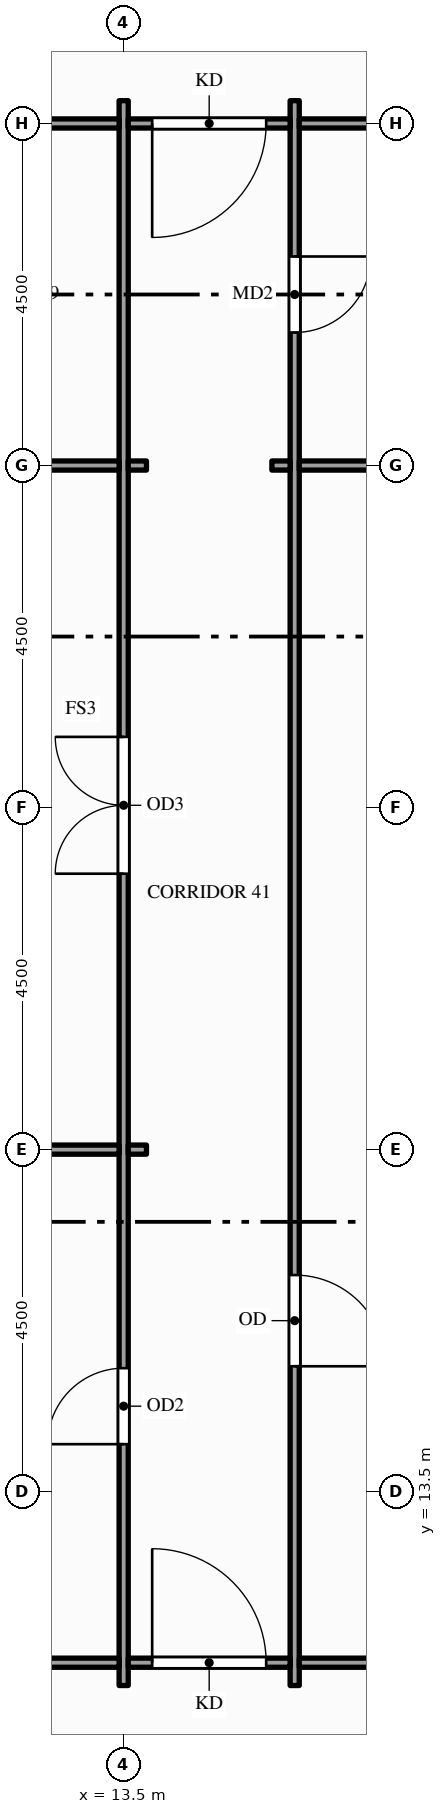
"""IFC4 building model, lengths in metres.
Left out: names, types, materials, properties, quantities, classifications, styles, units other than length and angle.
Written with IfcOpenShell. Run it as: python <this file> out.ifc"""

import sys

from ifc_helpers import new_model, si_unit, direction, frame, frame_2d, origin, place, context, subcontext, project, spatial, rectangle, extrude, element, fill, save


model = new_model("IFC4")
c1 = context("Model", 3, precision=1e-05, world=origin(), true_north=direction((0.0, 1.0)))
c2 = subcontext(c1, "Body", "Model", "MODEL_VIEW")
j1 = project(units=[si_unit("LENGTHUNIT", "METRE"), si_unit("PLANEANGLEUNIT", "RADIAN")], contexts=[c1])
p1 = place(None, origin())
s1 = spatial("IfcSite", under=j1, at=p1, CompositionType="ELEMENT")
p2 = place(p1, origin())
s2 = spatial("IfcBuilding", under=s1, at=p2, CompositionType="ELEMENT")
p3 = place(p2, frame((0.0, 0.0, 115.0)))
s3 = spatial("IfcBuildingStorey", under=s2, at=p3, CompositionType="ELEMENT", Elevation=115.0)
p4 = place(p3, frame((13.5, 10.95, 0.0), z_axis=(0.0, 0.0, 1.0), x_axis=(0.0, 1.0, 0.0)))
e1 = element("IfcWall", 1, at=p4, inside=s3, PredefinedType="PARTITIONING", context=c2, shape_type="SweptSolid", body=[
    extrude(rectangle(XDim=20.85, YDim=0.12, at=frame_2d((10.425, 0.0))), origin(), (0.0, 0.0, 1.0), 2.6),
])
p5 = place(p4, frame((3.175, 0.0, 0.0)))
e2 = element("IfcOpeningElement", 2, at=p5, cuts=e1, PredefinedType="OPENING", context=c2, shape_type="SweptSolid", body=[
    extrude(rectangle(XDim=1.0, YDim=2.1, at=frame_2d((0.5, 1.05))), frame((0.0, 0.07, 0.0), z_axis=(0.0, -1.0, 0.0), x_axis=(1.0, 0.0, 0.0)), (0.0, 0.0, 1.0), 0.14),
])
p6 = place(p4, frame((10.68, 0.0, 0.0)))
e3 = element("IfcOpeningElement", 3, at=p6, cuts=e1, PredefinedType="OPENING", context=c2, shape_type="SweptSolid", body=[
    extrude(rectangle(XDim=1.8, YDim=2.1, at=frame_2d((0.9, 1.05))), frame((0.0, 0.07, 0.0), z_axis=(0.0, -1.0, 0.0), x_axis=(1.0, 0.0, 0.0)), (0.0, 0.0, 1.0), 0.14),
])
p7 = place(p3, frame((15.75, 10.95, 0.0), z_axis=(0.0, 0.0, 1.0), x_axis=(0.0, 1.0, 0.0)))
e4 = element("IfcWall", 4, at=p7, inside=s3, PredefinedType="PARTITIONING", context=c2, shape_type="SweptSolid", body=[
    extrude(rectangle(XDim=20.85, YDim=0.12, at=frame_2d((10.425, 0.0))), origin(), (0.0, 0.0, 1.0), 2.6),
])
p8 = place(p7, frame((17.8, 0.0, 0.0)))
e5 = element("IfcOpeningElement", 5, at=p8, cuts=e4, PredefinedType="OPENING", context=c2, shape_type="SweptSolid", body=[
    extrude(rectangle(XDim=1.0, YDim=2.1, at=frame_2d((0.5, 1.05))), frame((0.0, 0.07, 0.0), z_axis=(0.0, -1.0, 0.0), x_axis=(1.0, 0.0, 0.0)), (0.0, 0.0, 1.0), 0.14),
])
p9 = place(p7, frame((4.2, 0.0, 0.0)))
e6 = element("IfcOpeningElement", 6, at=p9, cuts=e4, PredefinedType="OPENING", context=c2, shape_type="SweptSolid", body=[
    extrude(rectangle(XDim=1.2, YDim=2.1, at=frame_2d((0.6, 1.05))), frame((0.0, 0.07, 0.0), z_axis=(0.0, -1.0, 0.0), x_axis=(1.0, 0.0, 0.0)), (0.0, 0.0, 1.0), 0.14),
])
p10 = place(p3, frame((0.15, 11.25, 0.0), z_axis=(0.0, 0.0, 1.0), x_axis=(1.0, 0.0, 0.0)))
e7 = element("IfcWall", 7, at=p10, inside=s3, PredefinedType="PARTITIONING", context=c2, shape_type="SweptSolid", body=[
    extrude(rectangle(XDim=13.29, YDim=0.12, at=frame_2d((6.645, 0.0))), origin(), (0.0, 0.0, 1.0), 2.938),
])
p11 = place(p3, frame((13.56, 11.25, 0.0), z_axis=(0.0, 0.0, 1.0), x_axis=(1.0, 0.0, 0.0)))
e8 = element("IfcWall", 8, at=p11, inside=s3, PredefinedType="PARTITIONING", context=c2, shape_type="SweptSolid", body=[
    extrude(rectangle(XDim=2.13, YDim=0.12, at=frame_2d((1.065, 0.0))), origin(), (0.0, 0.0, 1.0), 2.938),
])
p12 = place(p11, frame((0.315, 0.0, 0.0)))
e9 = element("IfcOpeningElement", 9, at=p12, cuts=e8, PredefinedType="OPENING", context=c2, shape_type="SweptSolid", body=[
    extrude(rectangle(XDim=1.5, YDim=2.1, at=frame_2d((0.75, 1.05))), frame((0.0, 0.07, 0.0), z_axis=(0.0, -1.0, 0.0), x_axis=(1.0, 0.0, 0.0)), (0.0, 0.0, 1.0), 0.14),
])
p13 = place(p3, frame((15.81, 11.25, 0.0), z_axis=(0.0, 0.0, 1.0), x_axis=(1.0, 0.0, 0.0)))
e10 = element("IfcWall", 10, at=p13, inside=s3, PredefinedType="PARTITIONING", context=c2, shape_type="SweptSolid", body=[
    extrude(rectangle(XDim=15.63, YDim=0.12, at=frame_2d((7.815, 0.0))), origin(), (0.0, 0.0, 1.0), 2.76),
])
p14 = place(p13, frame((3.54, 0.0, 0.0)))
e11 = element("IfcOpeningElement", 11, at=p14, cuts=e10, PredefinedType="OPENING", context=c2, shape_type="SweptSolid", body=[
    extrude(rectangle(XDim=1.8, YDim=2.1, at=frame_2d((0.9, 1.05))), frame((0.0, 0.07, 0.0), z_axis=(0.0, -1.0, 0.0), x_axis=(1.0, 0.0, 0.0)), (0.0, 0.0, 1.0), 0.14),
])
p15 = place(p3, frame((0.15, 18.0, 0.0), z_axis=(0.0, 0.0, 1.0), x_axis=(1.0, 0.0, 0.0)))
e12 = element("IfcWall", 12, at=p15, inside=s3, PredefinedType="PARTITIONING", context=c2, shape_type="SweptSolid", body=[
    extrude(rectangle(XDim=13.29, YDim=0.12, at=frame_2d((6.645, 0.0))), origin(), (0.0, 0.0, 1.0), 2.938),
])
p16 = place(p3, frame((13.56, 18.0, 0.0), z_axis=(0.0, 0.0, 1.0), x_axis=(1.0, 0.0, 0.0)))
e13 = element("IfcWall", 13, at=p16, inside=s3, PredefinedType="PARTITIONING", context=c2, shape_type="SweptSolid", body=[
    extrude(rectangle(XDim=0.24, YDim=0.12, at=frame_2d((0.12, 0.0))), origin(), (0.0, 0.0, 1.0), 2.938),
])
p17 = place(p3, frame((9.56, 27.0, 0.0), z_axis=(0.0, 0.0, 1.0), x_axis=(1.0, 0.0, 0.0)))
e14 = element("IfcWall", 14, at=p17, inside=s3, PredefinedType="PARTITIONING", context=c2, shape_type="SweptSolid", body=[
    extrude(rectangle(XDim=3.88, YDim=0.12, at=frame_2d((1.94, 0.0))), origin(), (0.0, 0.0, 1.0), 2.938),
])
for number, where, z_axis, x_axis in (
    (15, (13.56, 27.0, 0.0), (0.0, 0.0, 1.0), (1.0, 0.0, 0.0)),
    (16, (15.45, 27.0, 0.0), (0.0, 0.0, 1.0), (1.0, 0.0, 0.0)),
):
    element("IfcWall", number, at=place(p3, frame(where, z_axis=z_axis, x_axis=x_axis)), inside=s3, PredefinedType="PARTITIONING", context=c2, shape_type="SweptSolid", body=[
        extrude(rectangle(XDim=0.24, YDim=0.12, at=frame_2d((0.12, 0.0))), origin(), (0.0, 0.0, 1.0), 2.938),
    ])
p18 = place(p3, frame((15.81, 27.0, 0.0), z_axis=(0.0, 0.0, 1.0), x_axis=(1.0, 0.0, 0.0)))
e17 = element("IfcWall", 17, at=p18, inside=s3, PredefinedType="PARTITIONING", context=c2, shape_type="SweptSolid", body=[
    extrude(rectangle(XDim=8.04, YDim=0.12, at=frame_2d((4.02, 0.0))), origin(), (0.0, 0.0, 1.0), 2.938),
])
p19 = place(p3, frame((9.56, 31.5, 0.0), z_axis=(0.0, 0.0, 1.0), x_axis=(1.0, 0.0, 0.0)))
e18 = element("IfcWall", 18, at=p19, inside=s3, PredefinedType="PARTITIONING", context=c2, shape_type="SweptSolid", body=[
    extrude(rectangle(XDim=3.88, YDim=0.12, at=frame_2d((1.94, 0.0))), origin(), (0.0, 0.0, 1.0), 2.938),
])
p20 = place(p19, frame((1.44, 0.0, 0.0)))
e19 = element("IfcOpeningElement", 19, at=p20, cuts=e18, PredefinedType="OPENING", context=c2, shape_type="SweptSolid", body=[
    extrude(rectangle(XDim=1.0, YDim=2.1, at=frame_2d((0.5, 1.05))), frame((0.0, 0.07, 0.0), z_axis=(0.0, -1.0, 0.0), x_axis=(1.0, 0.0, 0.0)), (0.0, 0.0, 1.0), 0.14),
])
p21 = place(p3, frame((13.56, 31.5, 0.0), z_axis=(0.0, 0.0, 1.0), x_axis=(1.0, 0.0, 0.0)))
e20 = element("IfcWall", 20, at=p21, inside=s3, PredefinedType="PARTITIONING", context=c2, shape_type="SweptSolid", body=[
    extrude(rectangle(XDim=2.13, YDim=0.12, at=frame_2d((1.065, 0.0))), origin(), (0.0, 0.0, 1.0), 2.938),
])
p22 = place(p21, frame((0.315, 0.0, 0.0)))
e21 = element("IfcOpeningElement", 21, at=p22, cuts=e20, PredefinedType="OPENING", context=c2, shape_type="SweptSolid", body=[
    extrude(rectangle(XDim=1.5, YDim=2.1, at=frame_2d((0.75, 1.05))), frame((0.0, 0.07, 0.0), z_axis=(0.0, -1.0, 0.0), x_axis=(1.0, 0.0, 0.0)), (0.0, 0.0, 1.0), 0.14),
])
p23 = place(p3, frame((15.81, 31.5, 0.0), z_axis=(0.0, 0.0, 1.0), x_axis=(1.0, 0.0, 0.0)))
e22 = element("IfcWall", 22, at=p23, inside=s3, PredefinedType="PARTITIONING", context=c2, shape_type="SweptSolid", body=[
    extrude(rectangle(XDim=8.04, YDim=0.12, at=frame_2d((4.02, 0.0))), origin(), (0.0, 0.0, 1.0), 2.938),
])
p24 = place(p12, origin())
e23 = element("IfcDoor", 23, at=p24, inside=s3, OperationType="SINGLE_SWING_LEFT", PredefinedType="DOOR", context=c2, shape_type="SweptSolid", body=[
    extrude(rectangle(XDim=1.5, YDim=2.1, at=frame_2d((0.75, 1.05))), frame((0.0, 0.025, 0.0), z_axis=(0.0, -1.0, 0.0), x_axis=(1.0, 0.0, 0.0)), (0.0, 0.0, 1.0), 0.05),
])
fill(e9, e23)
p25 = place(p22, origin())
e24 = element("IfcDoor", 24, at=p25, inside=s3, OperationType="SINGLE_SWING_LEFT", PredefinedType="DOOR", context=c2, shape_type="SweptSolid", body=[
    extrude(rectangle(XDim=1.5, YDim=2.1, at=frame_2d((0.75, 1.05))), frame((0.0, 0.025, 0.0), z_axis=(0.0, -1.0, 0.0), x_axis=(1.0, 0.0, 0.0)), (0.0, 0.0, 1.0), 0.05),
])
fill(e21, e24)
p26 = place(p5, origin())
e25 = element("IfcDoor", 25, at=p26, inside=s3, OperationType="SINGLE_SWING_LEFT", PredefinedType="DOOR", context=c2, shape_type="SweptSolid", body=[
    extrude(rectangle(XDim=1.0, YDim=2.1, at=frame_2d((0.5, 1.05))), frame((0.0, 0.025, 0.0), z_axis=(0.0, -1.0, 0.0), x_axis=(1.0, 0.0, 0.0)), (0.0, 0.0, 1.0), 0.05),
])
fill(e2, e25)
p27 = place(p6, origin())
e26 = element("IfcDoor", 26, at=p27, inside=s3, OperationType="DOUBLE_DOOR_SINGLE_SWING", PredefinedType="DOOR", context=c2, shape_type="SweptSolid", body=[
    extrude(rectangle(XDim=1.8, YDim=2.1, at=frame_2d((0.9, 1.05))), frame((0.0, 0.025, 0.0), z_axis=(0.0, -1.0, 0.0), x_axis=(1.0, 0.0, 0.0)), (0.0, 0.0, 1.0), 0.05),
])
fill(e3, e26)
p28 = place(p8, origin())
e27 = element("IfcDoor", 27, at=p28, inside=s3, OperationType="SINGLE_SWING_RIGHT", PredefinedType="DOOR", context=c2, shape_type="SweptSolid", body=[
    extrude(rectangle(XDim=1.0, YDim=2.1, at=frame_2d((0.5, 1.05))), frame((0.0, 0.025, 0.0), z_axis=(0.0, -1.0, 0.0), x_axis=(1.0, 0.0, 0.0)), (0.0, 0.0, 1.0), 0.05),
])
fill(e5, e27)
p29 = place(p9, origin())
e28 = element("IfcDoor", 28, at=p29, inside=s3, OperationType="SINGLE_SWING_LEFT", PredefinedType="DOOR", context=c2, shape_type="SweptSolid", body=[
    extrude(rectangle(XDim=1.2, YDim=2.1, at=frame_2d((0.6, 1.05))), frame((0.0, 0.025, 0.0), z_axis=(0.0, -1.0, 0.0), x_axis=(1.0, 0.0, 0.0)), (0.0, 0.0, 1.0), 0.05),
])
fill(e6, e28)
save(model, sys.argv[1])
